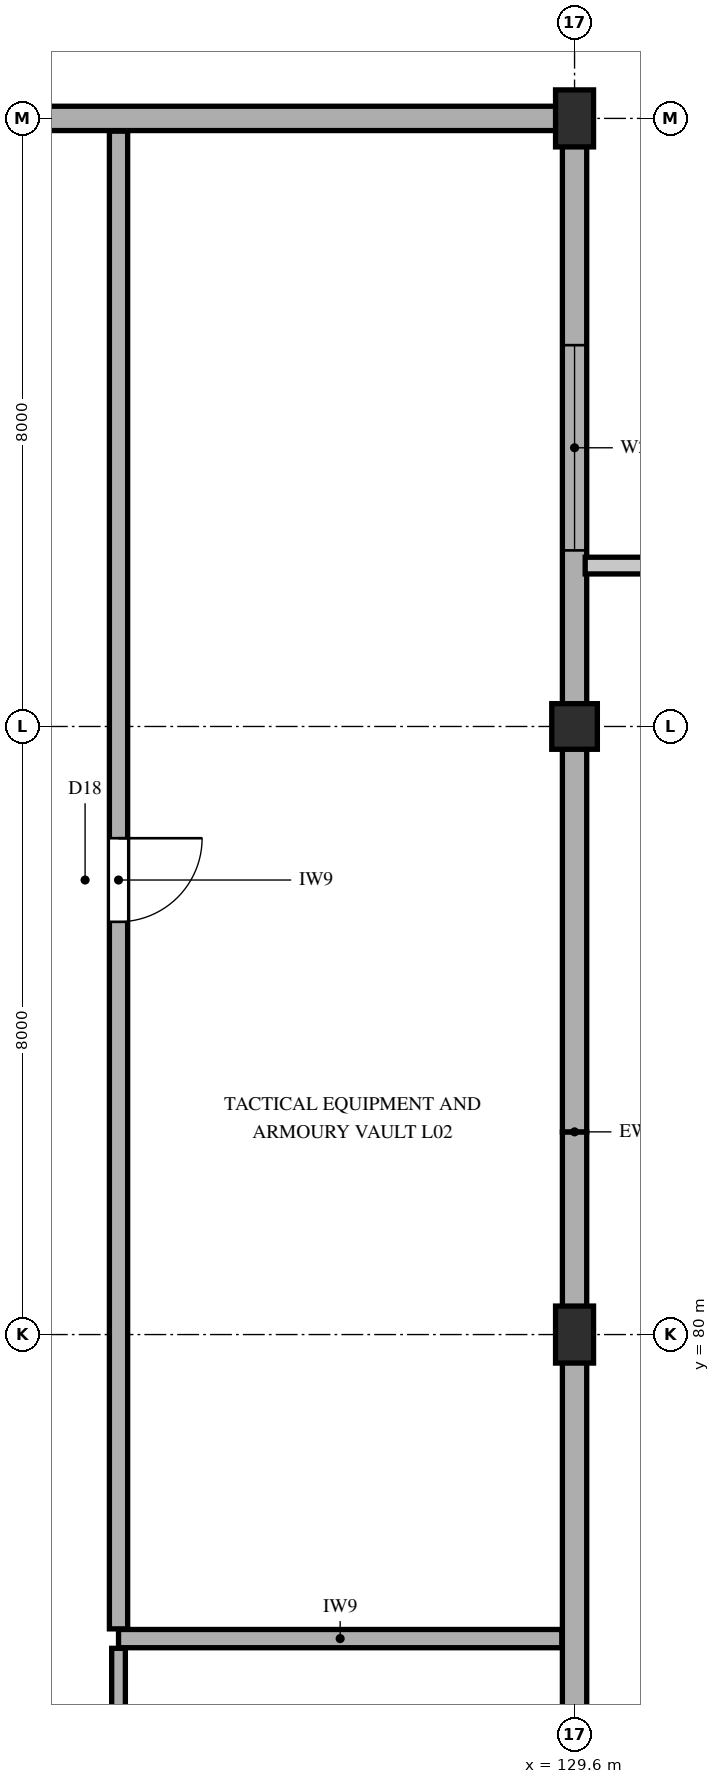
"""IFC4 building model, lengths in metres.
Left out: names, types, materials, properties, quantities, classifications, styles, units other than length and angle.
Written with IfcOpenShell. Run it as: python <this file> out.ifc"""

import sys

from ifc_helpers import new_model, si_unit, direction, frame, frame_2d, origin, origin_2d, place, context, subcontext, project, spatial, rectangle, extrude, element, fill, save


model = new_model("IFC4")
c1 = context("Model", 3, precision=1e-05, world=origin(), true_north=direction((0.0, 1.0)))
c2 = subcontext(c1, "Body", "Model", "MODEL_VIEW")
j1 = project(units=[si_unit("LENGTHUNIT", "METRE"), si_unit("PLANEANGLEUNIT", "RADIAN")], contexts=[c1])
p1 = place(None, origin())
s1 = spatial("IfcSite", under=j1, at=p1, CompositionType="ELEMENT")
p2 = place(p1, origin())
s2 = spatial("IfcBuilding", under=s1, at=p2, CompositionType="ELEMENT")
p3 = place(p2, frame((0.0, 0.0, 10.2)))
s3 = spatial("IfcBuildingStorey", under=s2, at=p3, CompositionType="ELEMENT", Elevation=10.2)
p4 = place(p3, frame((129.6, 80.0, 0.0), z_axis=(0.0, 0.0, 1.0), x_axis=(1.0, 0.0, 0.0)))
e1 = element("IfcColumn", 1, at=p4, inside=s3, PredefinedType="COLUMN", context=c2, shape_type="SweptSolid", body=[
    extrude(rectangle(XDim=0.5, YDim=0.75, at=origin_2d()), origin(), (0.0, 0.0, 1.0), 4.5),
])
p5 = place(p3, frame((129.6, 88.0, 0.0), z_axis=(0.0, 0.0, 1.0), x_axis=(1.0, 0.0, 0.0)))
e2 = element("IfcColumn", 2, at=p5, inside=s3, PredefinedType="COLUMN", context=c2, shape_type="SweptSolid", body=[
    extrude(rectangle(XDim=0.6, YDim=0.6, at=origin_2d()), origin(), (0.0, 0.0, 1.0), 4.5),
])
p6 = place(p3, frame((129.6, 96.0, 0.0), z_axis=(0.0, 0.0, 1.0), x_axis=(1.0, 0.0, 0.0)))
e3 = element("IfcColumn", 3, at=p6, inside=s3, PredefinedType="COLUMN", context=c2, shape_type="SweptSolid", body=[
    extrude(rectangle(XDim=0.5, YDim=0.75, at=origin_2d()), origin(), (0.0, 0.0, 1.0), 4.5),
])
p7 = place(p3, frame((129.6, 69.333, 0.0), z_axis=(0.0, 0.0, 1.0), x_axis=(0.0, 1.0, 0.0)))
e4 = element("IfcWall", 4, at=p7, inside=s3, PredefinedType="SOLIDWALL", context=c2, shape_type="SweptSolid", body=[
    extrude(rectangle(XDim=13.333, YDim=0.32, at=frame_2d((6.667, 0.0))), origin(), (0.0, 0.0, 1.0), 3.732),
])
p8 = place(p3, frame((129.6, 82.667, 0.0), z_axis=(0.0, 0.0, 1.0), x_axis=(0.0, 1.0, 0.0)))
e5 = element("IfcWall", 5, at=p8, inside=s3, PredefinedType="SOLIDWALL", context=c2, shape_type="SweptSolid", body=[
    extrude(rectangle(XDim=13.333, YDim=0.32, at=frame_2d((6.667, 0.0))), origin(), (0.0, 0.0, 1.0), 3.732),
])
p9 = place(p8, frame((7.65, 0.0, 0.95)))
e6 = element("IfcOpeningElement", 6, at=p9, cuts=e5, PredefinedType="OPENING", context=c2, shape_type="SweptSolid", body=[
    extrude(rectangle(XDim=2.7, YDim=0.9, at=frame_2d((1.35, 0.45))), frame((0.0, 0.17, 0.0), z_axis=(0.0, -1.0, 0.0), x_axis=(1.0, 0.0, 0.0)), (0.0, 0.0, 1.0), 0.34),
])
p10 = place(p3, frame((129.6, 96.0, 0.0), z_axis=(0.0, 0.0, 1.0), x_axis=(-1.0, 0.0, 0.0)))
e7 = element("IfcWall", 7, at=p10, inside=s3, PredefinedType="SOLIDWALL", context=c2, shape_type="SweptSolid", body=[
    extrude(rectangle(XDim=12.06, YDim=0.32, at=frame_2d((6.03, 0.0))), origin(), (0.0, 0.0, 1.0), 3.544),
])
p11 = place(p3, frame((123.6, 76.0, 0.0), z_axis=(0.0, 0.0, 1.0), x_axis=(1.0, 0.0, 0.0)))
e8 = element("IfcWall", 8, at=p11, inside=s3, PredefinedType="PARTITIONING", context=c2, shape_type="SweptSolid", body=[
    extrude(rectangle(XDim=5.832, YDim=0.24, at=frame_2d((2.916, 0.0))), origin(), (0.0, 0.0, 1.0), 4.24),
])
p12 = place(p3, frame((123.6, 56.168, 0.0), z_axis=(0.0, 0.0, 1.0), x_axis=(0.0, 1.0, 0.0)))
e9 = element("IfcWall", 9, at=p12, inside=s3, PredefinedType="PARTITIONING", context=c2, shape_type="SweptSolid", body=[
    extrude(rectangle(XDim=19.704, YDim=0.18, at=frame_2d((9.852, 0.0))), origin(), (0.0, 0.0, 1.0), 4.24),
])
p13 = place(p12, frame((9.102, 0.0, 0.0)))
e10 = element("IfcOpeningElement", 10, at=p13, cuts=e9, PredefinedType="OPENING", context=c2, shape_type="SweptSolid", body=[
    extrude(rectangle(XDim=1.5, YDim=2.3, at=frame_2d((0.75, 1.15))), frame((0.0, 0.1, 0.0), z_axis=(0.0, -1.0, 0.0), x_axis=(1.0, 0.0, 0.0)), (0.0, 0.0, 1.0), 0.2),
])
p14 = place(p3, frame((123.6, 76.128, 0.0), z_axis=(0.0, 0.0, 1.0), x_axis=(0.0, 1.0, 0.0)))
e11 = element("IfcWall", 11, at=p14, inside=s3, PredefinedType="PARTITIONING", context=c2, shape_type="SweptSolid", body=[
    extrude(rectangle(XDim=19.704, YDim=0.24, at=frame_2d((9.852, 0.0))), origin(), (0.0, 0.0, 1.0), 4.24),
])
p15 = place(p14, frame((9.302, 0.0, 0.0)))
e12 = element("IfcOpeningElement", 12, at=p15, cuts=e11, PredefinedType="OPENING", context=c2, shape_type="SweptSolid", body=[
    extrude(rectangle(XDim=1.1, YDim=2.25, at=frame_2d((0.55, 1.125))), frame((0.0, 0.13, 0.0), z_axis=(0.0, -1.0, 0.0), x_axis=(1.0, 0.0, 0.0)), (0.0, 0.0, 1.0), 0.26),
])
p16 = place(p9, origin())
e13 = element("IfcWindow", 13, at=p16, inside=s3, PartitioningType="TRIPLE_PANEL_VERTICAL", PredefinedType="WINDOW", context=c2, shape_type="SweptSolid", body=[
    extrude(rectangle(XDim=2.7, YDim=0.9, at=frame_2d((1.35, 0.45))), frame((0.0, 0.03, 0.0), z_axis=(0.0, -1.0, 0.0), x_axis=(1.0, 0.0, 0.0)), (0.0, 0.0, 1.0), 0.06),
])
fill(e6, e13)
p17 = place(p15, frame((1.1, 0.0, 0.0), z_axis=(0.0, 0.0, 1.0), x_axis=(-1.0, 0.0, 0.0)))
e14 = element("IfcDoor", 14, at=p17, inside=s3, OperationType="SINGLE_SWING_RIGHT", PredefinedType="DOOR", context=c2, shape_type="SweptSolid", body=[
    extrude(rectangle(XDim=1.1, YDim=2.25, at=frame_2d((0.55, 1.125))), frame((0.0, 0.025, 0.0), z_axis=(0.0, -1.0, 0.0), x_axis=(1.0, 0.0, 0.0)), (0.0, 0.0, 1.0), 0.05),
])
fill(e12, e14)
save(model, sys.argv[1])
